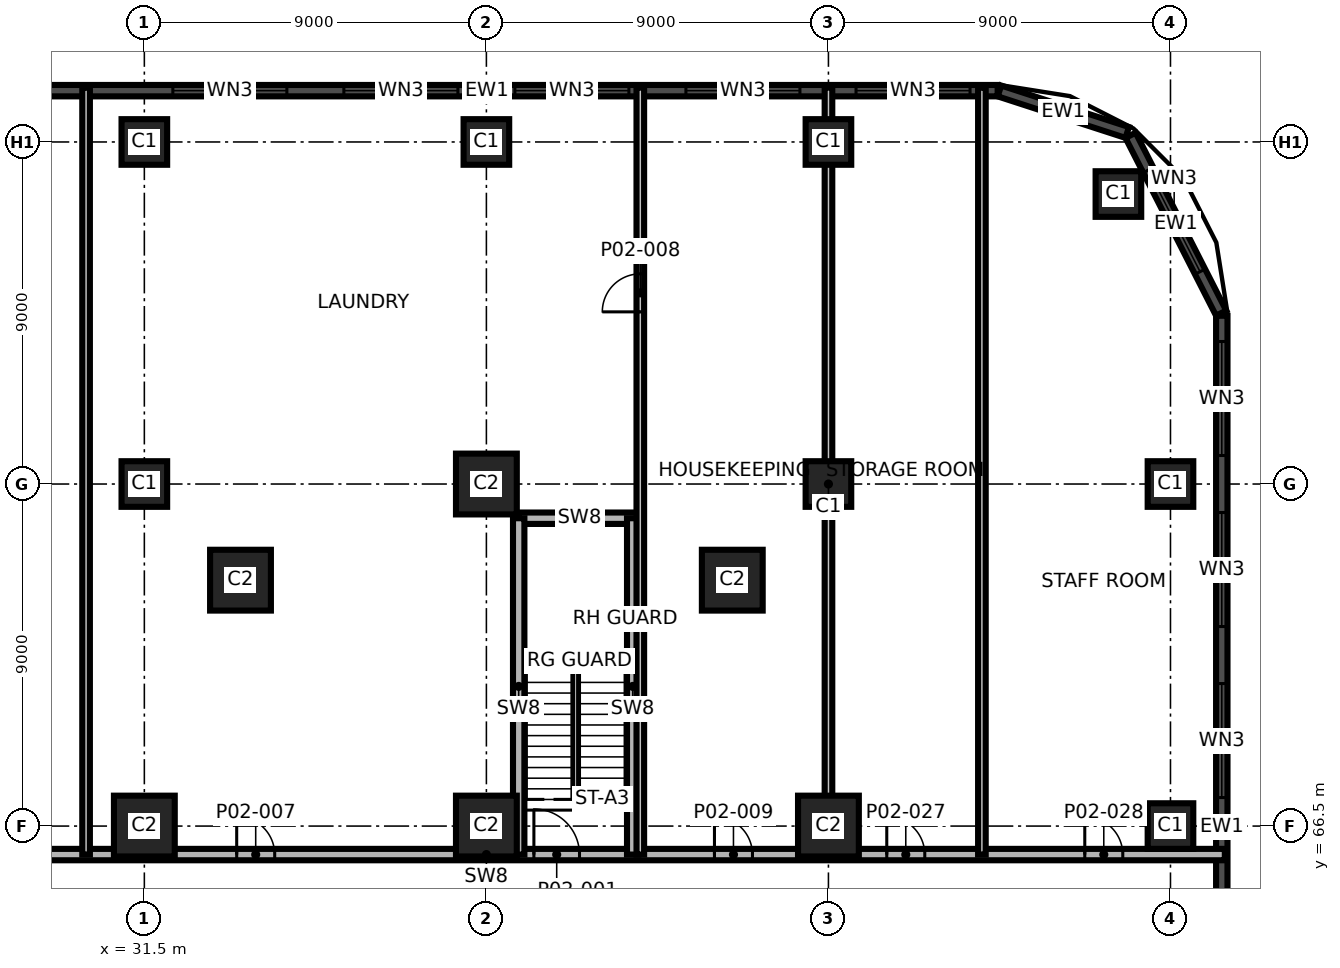
"""IFC4 building model, lengths in metres.
Left out: names, types, materials, properties, quantities, classifications, styles, units other than length and angle.
Written with IfcOpenShell. Run it as: python <this file> out.ifc"""

import sys

from ifc_helpers import new_model, si_unit, direction, frame, frame_2d, origin, origin_2d, place, context, subcontext, project, spatial, rectangle, extrude, element, fill, save


model = new_model("IFC4")
c1 = context("Model", 3, precision=1e-05, world=origin(), true_north=direction((0.0, 1.0)))
c2 = subcontext(c1, "Body", "Model", "MODEL_VIEW")
j1 = project(units=[si_unit("LENGTHUNIT", "METRE"), si_unit("PLANEANGLEUNIT", "RADIAN")], contexts=[c1])
p1 = place(None, origin())
s1 = spatial("IfcSite", under=j1, at=p1, CompositionType="ELEMENT")
p2 = place(p1, origin())
s2 = spatial("IfcBuilding", under=s1, at=p2, CompositionType="ELEMENT")
p3 = place(p2, frame((0.0, 0.0, 13.5)))
s3 = spatial("IfcBuildingStorey", under=s2, at=p3, CompositionType="ELEMENT", Elevation=13.5)
for number, where, z_axis, x_axis in (
    (1, (31.5, 66.5, 0.0), (0.0, 0.0, 1.0), (1.0, 0.0, 0.0)),
    (2, (40.5, 66.5, 0.0), (0.0, 0.0, 1.0), (1.0, 0.0, 0.0)),
    (3, (49.5, 66.5, 0.0), (0.0, 0.0, 1.0), (1.0, 0.0, 0.0)),
):
    element("IfcColumn", number, at=place(p3, frame(where, z_axis=z_axis, x_axis=x_axis)), inside=s3, PredefinedType="COLUMN", context=c2, shape_type="SweptSolid", body=[
        extrude(rectangle(XDim=1.6, YDim=1.6, at=origin_2d()), origin(), (0.0, 0.0, 1.0), 5.0),
    ])
for number, where, z_axis, x_axis in (
    (4, (58.5, 66.5, 0.0), (0.0, 0.0, 1.0), (1.0, 0.0, 0.0)),
    (5, (31.5, 75.5, 0.0), (0.0, 0.0, 1.0), (1.0, 0.0, 0.0)),
):
    element("IfcColumn", number, at=place(p3, frame(where, z_axis=z_axis, x_axis=x_axis)), inside=s3, PredefinedType="COLUMN", context=c2, shape_type="SweptSolid", body=[
        extrude(rectangle(XDim=1.2, YDim=1.2, at=origin_2d()), origin(), (0.0, 0.0, 1.0), 5.0),
    ])
p4 = place(p3, frame((40.5, 75.5, 0.0), z_axis=(0.0, 0.0, 1.0), x_axis=(1.0, 0.0, 0.0)))
e6 = element("IfcColumn", 6, at=p4, inside=s3, PredefinedType="COLUMN", context=c2, shape_type="SweptSolid", body=[
    extrude(rectangle(XDim=1.6, YDim=1.6, at=origin_2d()), origin(), (0.0, 0.0, 1.0), 5.0),
])
for number, where, z_axis, x_axis in (
    (7, (49.5, 75.5, 0.0), (0.0, 0.0, 1.0), (1.0, 0.0, 0.0)),
    (8, (58.5, 75.5, 0.0), (0.0, 0.0, 1.0), (1.0, 0.0, 0.0)),
    (9, (57.13, 83.13, 0.0), (0.0, 0.0, 1.0), (1.0, 0.0, 0.0)),
    (10, (31.5, 84.5, 0.0), (0.0, 0.0, 1.0), (1.0, 0.0, 0.0)),
    (11, (40.5, 84.5, 0.0), (0.0, 0.0, 1.0), (1.0, 0.0, 0.0)),
    (12, (49.5, 84.5, 0.0), (0.0, 0.0, 1.0), (1.0, 0.0, 0.0)),
):
    element("IfcColumn", number, at=place(p3, frame(where, z_axis=z_axis, x_axis=x_axis)), inside=s3, PredefinedType="COLUMN", context=c2, shape_type="SweptSolid", body=[
        extrude(rectangle(XDim=1.2, YDim=1.2, at=origin_2d()), origin(), (0.0, 0.0, 1.0), 5.0),
    ])
for number, where, z_axis, x_axis in (
    (13, (34.03, 72.97, 0.0), (0.0, 0.0, 1.0), (1.0, 0.0, 0.0)),
    (14, (46.97, 72.97, 0.0), (0.0, 0.0, 1.0), (1.0, 0.0, 0.0)),
):
    element("IfcColumn", number, at=place(p3, frame(where, z_axis=z_axis, x_axis=x_axis)), inside=s3, PredefinedType="COLUMN", context=c2, shape_type="SweptSolid", body=[
        extrude(rectangle(XDim=1.6, YDim=1.6, at=origin_2d()), origin(), (0.0, 0.0, 1.0), 5.0),
    ])
p5 = place(p3, frame((59.85, 53.0, 0.0), z_axis=(0.0, 0.0, 1.0), x_axis=(0.0, 1.0, 0.0)))
e15 = element("IfcWall", 15, at=p5, inside=s3, PredefinedType="SOLIDWALL", context=c2, shape_type="SweptSolid", body=[
    extrude(rectangle(XDim=26.928, YDim=0.3, at=frame_2d((13.464, 0.0))), origin(), (0.0, 0.0, 1.0), 4.7),
])
p6 = place(p5, frame((5.25, 0.0, 0.9)))
e16 = element("IfcOpeningElement", 16, at=p6, cuts=e15, PredefinedType="OPENING", context=c2, shape_type="SweptSolid", body=[
    extrude(rectangle(XDim=3.0, YDim=2.4, at=frame_2d((1.5, 1.2))), frame((0.0, 0.16, 0.0), z_axis=(0.0, -1.0, 0.0), x_axis=(1.0, 0.0, 0.0)), (0.0, 0.0, 1.0), 0.32),
])
p7 = place(p5, frame((14.25, 0.0, 0.9)))
e17 = element("IfcOpeningElement", 17, at=p7, cuts=e15, PredefinedType="OPENING", context=c2, shape_type="SweptSolid", body=[
    extrude(rectangle(XDim=3.0, YDim=2.4, at=frame_2d((1.5, 1.2))), frame((0.0, 0.16, 0.0), z_axis=(0.0, -1.0, 0.0), x_axis=(1.0, 0.0, 0.0)), (0.0, 0.0, 1.0), 0.32),
])
p8 = place(p5, frame((18.75, 0.0, 0.9)))
e18 = element("IfcOpeningElement", 18, at=p8, cuts=e15, PredefinedType="OPENING", context=c2, shape_type="SweptSolid", body=[
    extrude(rectangle(XDim=3.0, YDim=2.4, at=frame_2d((1.5, 1.2))), frame((0.0, 0.16, 0.0), z_axis=(0.0, -1.0, 0.0), x_axis=(1.0, 0.0, 0.0)), (0.0, 0.0, 1.0), 0.32),
])
p9 = place(p5, frame((23.25, 0.0, 0.9)))
e19 = element("IfcOpeningElement", 19, at=p9, cuts=e15, PredefinedType="OPENING", context=c2, shape_type="SweptSolid", body=[
    extrude(rectangle(XDim=3.0, YDim=2.4, at=frame_2d((1.5, 1.2))), frame((0.0, 0.16, 0.0), z_axis=(0.0, -1.0, 0.0), x_axis=(1.0, 0.0, 0.0)), (0.0, 0.0, 1.0), 0.32),
])
p10 = place(p3, frame((59.834, 79.996, 0.0), z_axis=(0.0, 0.0, 1.0), x_axis=(-0.454006562826, 0.890998339455, 0.0)))
e20 = element("IfcWall", 20, at=p10, inside=s3, PredefinedType="SOLIDWALL", context=c2, shape_type="SweptSolid", body=[
    extrude(rectangle(XDim=5.252, YDim=0.3, at=frame_2d((2.626, 0.0))), origin(), (0.0, 0.0, 1.0), 4.7),
])
p11 = place(p10, frame((1.224, 0.0, 0.9)))
e21 = element("IfcOpeningElement", 21, at=p11, cuts=e20, PredefinedType="OPENING", context=c2, shape_type="SweptSolid", body=[
    extrude(rectangle(XDim=3.0, YDim=2.4, at=frame_2d((1.5, 1.2))), frame((0.0, 0.16, 0.0), z_axis=(0.0, -1.0, 0.0), x_axis=(1.0, 0.0, 0.0)), (0.0, 0.0, 1.0), 0.32),
])
p12 = place(p3, frame((57.362, 84.75, 0.0), z_axis=(0.0, 0.0, 1.0), x_axis=(-0.951038127287, 0.309073584194, 0.0)))
e22 = element("IfcWall", 22, at=p12, inside=s3, PredefinedType="SOLIDWALL", context=c2, shape_type="SweptSolid", body=[
    extrude(rectangle(XDim=3.536, YDim=0.3, at=frame_2d((1.768, 0.0))), origin(), (0.0, 0.0, 1.0), 4.7),
])
p13 = place(p3, frame((53.952, 85.85, 0.0), z_axis=(0.0, 0.0, 1.0), x_axis=(-1.0, 0.0, 0.0)))
e23 = element("IfcWall", 23, at=p13, inside=s3, PredefinedType="SOLIDWALL", context=c2, shape_type="SweptSolid", body=[
    extrude(rectangle(XDim=26.88, YDim=0.3, at=frame_2d((13.44, 0.0))), origin(), (0.0, 0.0, 1.0), 4.7),
])
p14 = place(p13, frame((0.726, 0.0, 0.9)))
e24 = element("IfcOpeningElement", 24, at=p14, cuts=e23, PredefinedType="OPENING", context=c2, shape_type="SweptSolid", body=[
    extrude(rectangle(XDim=3.0, YDim=2.4, at=frame_2d((1.5, 1.2))), frame((0.0, 0.16, 0.0), z_axis=(0.0, -1.0, 0.0), x_axis=(1.0, 0.0, 0.0)), (0.0, 0.0, 1.0), 0.32),
])
p15 = place(p13, frame((5.202, 0.0, 0.9)))
e25 = element("IfcOpeningElement", 25, at=p15, cuts=e23, PredefinedType="OPENING", context=c2, shape_type="SweptSolid", body=[
    extrude(rectangle(XDim=3.0, YDim=2.4, at=frame_2d((1.5, 1.2))), frame((0.0, 0.16, 0.0), z_axis=(0.0, -1.0, 0.0), x_axis=(1.0, 0.0, 0.0)), (0.0, 0.0, 1.0), 0.32),
])
p16 = place(p13, frame((9.702, 0.0, 0.9)))
e26 = element("IfcOpeningElement", 26, at=p16, cuts=e23, PredefinedType="OPENING", context=c2, shape_type="SweptSolid", body=[
    extrude(rectangle(XDim=3.0, YDim=2.4, at=frame_2d((1.5, 1.2))), frame((0.0, 0.16, 0.0), z_axis=(0.0, -1.0, 0.0), x_axis=(1.0, 0.0, 0.0)), (0.0, 0.0, 1.0), 0.32),
])
p17 = place(p13, frame((14.202, 0.0, 0.9)))
e27 = element("IfcOpeningElement", 27, at=p17, cuts=e23, PredefinedType="OPENING", context=c2, shape_type="SweptSolid", body=[
    extrude(rectangle(XDim=3.0, YDim=2.4, at=frame_2d((1.5, 1.2))), frame((0.0, 0.16, 0.0), z_axis=(0.0, -1.0, 0.0), x_axis=(1.0, 0.0, 0.0)), (0.0, 0.0, 1.0), 0.32),
])
p18 = place(p13, frame((18.702, 0.0, 0.9)))
e28 = element("IfcOpeningElement", 28, at=p18, cuts=e23, PredefinedType="OPENING", context=c2, shape_type="SweptSolid", body=[
    extrude(rectangle(XDim=3.0, YDim=2.4, at=frame_2d((1.5, 1.2))), frame((0.0, 0.16, 0.0), z_axis=(0.0, -1.0, 0.0), x_axis=(1.0, 0.0, 0.0)), (0.0, 0.0, 1.0), 0.32),
])
p19 = place(p3, frame((21.07, 65.75, 0.0), z_axis=(0.0, 0.0, 1.0), x_axis=(1.0, 0.0, 0.0)))
e29 = element("IfcWall", 29, at=p19, inside=s3, PredefinedType="SHEAR", context=c2, shape_type="SweptSolid", body=[
    extrude(rectangle(XDim=38.86, YDim=0.3, at=frame_2d((19.43, 0.0))), origin(), (0.0, 0.0, 1.0), 4.7),
])
p20 = place(p19, frame((20.68, 0.0, 0.0)))
e30 = element("IfcOpeningElement", 30, at=p20, cuts=e29, PredefinedType="OPENING", context=c2, shape_type="SweptSolid", body=[
    extrude(rectangle(XDim=1.2, YDim=2.1, at=frame_2d((0.6, 1.05))), frame((0.0, 0.16, 0.0), z_axis=(0.0, -1.0, 0.0), x_axis=(1.0, 0.0, 0.0)), (0.0, 0.0, 1.0), 0.32),
])
p21 = place(p19, frame((12.86, 0.0, 0.0)))
e31 = element("IfcOpeningElement", 31, at=p21, cuts=e29, PredefinedType="OPENING", context=c2, shape_type="SweptSolid", body=[
    extrude(rectangle(XDim=1.0, YDim=2.1, at=frame_2d((0.5, 1.05))), frame((0.0, 0.16, 0.0), z_axis=(0.0, -1.0, 0.0), x_axis=(1.0, 0.0, 0.0)), (0.0, 0.0, 1.0), 0.32),
])
p22 = place(p19, frame((25.431, 0.0, 0.0)))
e32 = element("IfcOpeningElement", 32, at=p22, cuts=e29, PredefinedType="OPENING", context=c2, shape_type="SweptSolid", body=[
    extrude(rectangle(XDim=1.0, YDim=2.1, at=frame_2d((0.5, 1.05))), frame((0.0, 0.16, 0.0), z_axis=(0.0, -1.0, 0.0), x_axis=(1.0, 0.0, 0.0)), (0.0, 0.0, 1.0), 0.32),
])
p23 = place(p19, frame((3.886, 0.0, 0.0)))
e33 = element("IfcOpeningElement", 33, at=p23, cuts=e29, PredefinedType="OPENING", context=c2, shape_type="SweptSolid", body=[
    extrude(rectangle(XDim=1.0, YDim=2.1, at=frame_2d((0.5, 1.05))), frame((0.0, 0.16, 0.0), z_axis=(0.0, -1.0, 0.0), x_axis=(1.0, 0.0, 0.0)), (0.0, 0.0, 1.0), 0.32),
])
p24 = place(p19, frame((29.965, 0.0, 0.0)))
e34 = element("IfcOpeningElement", 34, at=p24, cuts=e29, PredefinedType="OPENING", context=c2, shape_type="SweptSolid", body=[
    extrude(rectangle(XDim=1.0, YDim=2.1, at=frame_2d((0.5, 1.05))), frame((0.0, 0.16, 0.0), z_axis=(0.0, -1.0, 0.0), x_axis=(1.0, 0.0, 0.0)), (0.0, 0.0, 1.0), 0.32),
])
p25 = place(p19, frame((35.175, 0.0, 0.0)))
e35 = element("IfcOpeningElement", 35, at=p25, cuts=e29, PredefinedType="OPENING", context=c2, shape_type="SweptSolid", body=[
    extrude(rectangle(XDim=1.0, YDim=2.1, at=frame_2d((0.5, 1.05))), frame((0.0, 0.16, 0.0), z_axis=(0.0, -1.0, 0.0), x_axis=(1.0, 0.0, 0.0)), (0.0, 0.0, 1.0), 0.32),
])
p26 = place(p3, frame((41.35, 74.6, 0.0), z_axis=(0.0, 0.0, 1.0), x_axis=(1.0, 0.0, 0.0)))
e36 = element("IfcWall", 36, at=p26, inside=s3, PredefinedType="SHEAR", context=c2, shape_type="SweptSolid", body=[
    extrude(rectangle(XDim=3.2, YDim=0.3, at=frame_2d((1.6, 0.0))), origin(), (0.0, 0.0, 1.0), 4.7),
])
p27 = place(p3, frame((29.967, 65.75, 0.0), z_axis=(0.0, 0.0, 1.0), x_axis=(0.0, 1.0, 0.0)))
e37 = element("IfcWall", 37, at=p27, inside=s3, PredefinedType="PARTITIONING", context=c2, shape_type="SweptSolid", body=[
    extrude(rectangle(XDim=20.18, YDim=0.2, at=frame_2d((10.09, 0.0))), origin(), (0.0, 0.0, 1.0), 4.7),
])
for number, where, z_axis, x_axis in (
    (38, (41.35, 65.75, 0.0), (0.0, 0.0, 1.0), (0.0, 1.0, 0.0)),
    (39, (44.35, 65.75, 0.0), (0.0, 0.0, 1.0), (0.0, 1.0, 0.0)),
):
    element("IfcWall", number, at=place(p3, frame(where, z_axis=z_axis, x_axis=x_axis)), inside=s3, PredefinedType="SHEAR", context=c2, shape_type="SweptSolid", body=[
        extrude(rectangle(XDim=8.85, YDim=0.3, at=frame_2d((4.425, 0.0))), origin(), (0.0, 0.0, 1.0), 4.7),
    ])
p28 = place(p3, frame((44.55, 65.75, 0.0), z_axis=(0.0, 0.0, 1.0), x_axis=(0.0, 1.0, 0.0)))
e40 = element("IfcWall", 40, at=p28, inside=s3, PredefinedType="PARTITIONING", context=c2, shape_type="SweptSolid", body=[
    extrude(rectangle(XDim=20.18, YDim=0.2, at=frame_2d((10.09, 0.0))), origin(), (0.0, 0.0, 1.0), 4.7),
])
p29 = place(p28, frame((14.28, 0.0, 0.0)))
e41 = element("IfcOpeningElement", 41, at=p29, cuts=e40, PredefinedType="OPENING", context=c2, shape_type="SweptSolid", body=[
    extrude(rectangle(XDim=1.0, YDim=2.1, at=frame_2d((0.5, 1.05))), frame((0.0, 0.11, 0.0), z_axis=(0.0, -1.0, 0.0), x_axis=(1.0, 0.0, 0.0)), (0.0, 0.0, 1.0), 0.22),
])
for number, where, z_axis, x_axis in (
    (42, (49.501, 65.75, 0.0), (0.0, 0.0, 1.0), (0.0, 1.0, 0.0)),
    (43, (53.538, 65.75, 0.0), (0.0, 0.0, 1.0), (0.0, 1.0, 0.0)),
):
    element("IfcWall", number, at=place(p3, frame(where, z_axis=z_axis, x_axis=x_axis)), inside=s3, PredefinedType="PARTITIONING", context=c2, shape_type="SweptSolid", body=[
        extrude(rectangle(XDim=20.18, YDim=0.2, at=frame_2d((10.09, 0.0))), origin(), (0.0, 0.0, 1.0), 4.7),
    ])
p30 = place(p7, origin())
e44 = element("IfcWindow", 44, at=p30, inside=s3, PartitioningType="SINGLE_PANEL", PredefinedType="WINDOW", context=c2, shape_type="SweptSolid", body=[
    extrude(rectangle(XDim=3.0, YDim=2.4, at=frame_2d((1.5, 1.2))), frame((0.0, 0.03, 0.0), z_axis=(0.0, -1.0, 0.0), x_axis=(1.0, 0.0, 0.0)), (0.0, 0.0, 1.0), 0.06),
])
fill(e17, e44)
p31 = place(p8, origin())
e45 = element("IfcWindow", 45, at=p31, inside=s3, PartitioningType="SINGLE_PANEL", PredefinedType="WINDOW", context=c2, shape_type="SweptSolid", body=[
    extrude(rectangle(XDim=3.0, YDim=2.4, at=frame_2d((1.5, 1.2))), frame((0.0, 0.03, 0.0), z_axis=(0.0, -1.0, 0.0), x_axis=(1.0, 0.0, 0.0)), (0.0, 0.0, 1.0), 0.06),
])
fill(e18, e45)
p32 = place(p9, origin())
e46 = element("IfcWindow", 46, at=p32, inside=s3, PartitioningType="SINGLE_PANEL", PredefinedType="WINDOW", context=c2, shape_type="SweptSolid", body=[
    extrude(rectangle(XDim=3.0, YDim=2.4, at=frame_2d((1.5, 1.2))), frame((0.0, 0.03, 0.0), z_axis=(0.0, -1.0, 0.0), x_axis=(1.0, 0.0, 0.0)), (0.0, 0.0, 1.0), 0.06),
])
fill(e19, e46)
p33 = place(p11, origin())
e47 = element("IfcWindow", 47, at=p33, inside=s3, PartitioningType="SINGLE_PANEL", PredefinedType="WINDOW", context=c2, shape_type="SweptSolid", body=[
    extrude(rectangle(XDim=3.0, YDim=2.4, at=frame_2d((1.5, 1.2))), frame((0.0, 0.03, 0.0), z_axis=(0.0, -1.0, 0.0), x_axis=(1.0, 0.0, 0.0)), (0.0, 0.0, 1.0), 0.06),
])
fill(e21, e47)
p34 = place(p14, origin())
e48 = element("IfcWindow", 48, at=p34, inside=s3, PartitioningType="SINGLE_PANEL", PredefinedType="WINDOW", context=c2, shape_type="SweptSolid", body=[
    extrude(rectangle(XDim=3.0, YDim=2.4, at=frame_2d((1.5, 1.2))), frame((0.0, 0.03, 0.0), z_axis=(0.0, -1.0, 0.0), x_axis=(1.0, 0.0, 0.0)), (0.0, 0.0, 1.0), 0.06),
])
fill(e24, e48)
p35 = place(p15, origin())
e49 = element("IfcWindow", 49, at=p35, inside=s3, PartitioningType="SINGLE_PANEL", PredefinedType="WINDOW", context=c2, shape_type="SweptSolid", body=[
    extrude(rectangle(XDim=3.0, YDim=2.4, at=frame_2d((1.5, 1.2))), frame((0.0, 0.03, 0.0), z_axis=(0.0, -1.0, 0.0), x_axis=(1.0, 0.0, 0.0)), (0.0, 0.0, 1.0), 0.06),
])
fill(e25, e49)
p36 = place(p16, origin())
e50 = element("IfcWindow", 50, at=p36, inside=s3, PartitioningType="SINGLE_PANEL", PredefinedType="WINDOW", context=c2, shape_type="SweptSolid", body=[
    extrude(rectangle(XDim=3.0, YDim=2.4, at=frame_2d((1.5, 1.2))), frame((0.0, 0.03, 0.0), z_axis=(0.0, -1.0, 0.0), x_axis=(1.0, 0.0, 0.0)), (0.0, 0.0, 1.0), 0.06),
])
fill(e26, e50)
p37 = place(p17, origin())
e51 = element("IfcWindow", 51, at=p37, inside=s3, PartitioningType="SINGLE_PANEL", PredefinedType="WINDOW", context=c2, shape_type="SweptSolid", body=[
    extrude(rectangle(XDim=3.0, YDim=2.4, at=frame_2d((1.5, 1.2))), frame((0.0, 0.03, 0.0), z_axis=(0.0, -1.0, 0.0), x_axis=(1.0, 0.0, 0.0)), (0.0, 0.0, 1.0), 0.06),
])
fill(e27, e51)
p38 = place(p18, origin())
e52 = element("IfcWindow", 52, at=p38, inside=s3, PartitioningType="SINGLE_PANEL", PredefinedType="WINDOW", context=c2, shape_type="SweptSolid", body=[
    extrude(rectangle(XDim=3.0, YDim=2.4, at=frame_2d((1.5, 1.2))), frame((0.0, 0.03, 0.0), z_axis=(0.0, -1.0, 0.0), x_axis=(1.0, 0.0, 0.0)), (0.0, 0.0, 1.0), 0.06),
])
fill(e28, e52)
p39 = place(p20, origin())
e53 = element("IfcDoor", 53, at=p39, inside=s3, OperationType="SINGLE_SWING_LEFT", PredefinedType="DOOR", context=c2, shape_type="SweptSolid", body=[
    extrude(rectangle(XDim=1.2, YDim=2.1, at=frame_2d((0.6, 1.05))), frame((0.0, 0.025, 0.0), z_axis=(0.0, -1.0, 0.0), x_axis=(1.0, 0.0, 0.0)), (0.0, 0.0, 1.0), 0.05),
])
fill(e30, e53)
p40 = place(p21, origin())
e54 = element("IfcDoor", 54, at=p40, inside=s3, OperationType="SINGLE_SWING_LEFT", PredefinedType="DOOR", context=c2, shape_type="SweptSolid", body=[
    extrude(rectangle(XDim=1.0, YDim=2.1, at=frame_2d((0.5, 1.05))), frame((0.0, 0.025, 0.0), z_axis=(0.0, -1.0, 0.0), x_axis=(1.0, 0.0, 0.0)), (0.0, 0.0, 1.0), 0.05),
])
fill(e31, e54)
p41 = place(p29, origin())
e55 = element("IfcDoor", 55, at=p41, inside=s3, OperationType="SINGLE_SWING_RIGHT", PredefinedType="DOOR", context=c2, shape_type="SweptSolid", body=[
    extrude(rectangle(XDim=1.0, YDim=2.1, at=frame_2d((0.5, 1.05))), frame((0.0, 0.025, 0.0), z_axis=(0.0, -1.0, 0.0), x_axis=(1.0, 0.0, 0.0)), (0.0, 0.0, 1.0), 0.05),
])
fill(e41, e55)
p42 = place(p22, origin())
e56 = element("IfcDoor", 56, at=p42, inside=s3, OperationType="SINGLE_SWING_LEFT", PredefinedType="DOOR", context=c2, shape_type="SweptSolid", body=[
    extrude(rectangle(XDim=1.0, YDim=2.1, at=frame_2d((0.5, 1.05))), frame((0.0, 0.025, 0.0), z_axis=(0.0, -1.0, 0.0), x_axis=(1.0, 0.0, 0.0)), (0.0, 0.0, 1.0), 0.05),
])
fill(e32, e56)
p43 = place(p24, origin())
e57 = element("IfcDoor", 57, at=p43, inside=s3, OperationType="SINGLE_SWING_LEFT", PredefinedType="DOOR", context=c2, shape_type="SweptSolid", body=[
    extrude(rectangle(XDim=1.0, YDim=2.1, at=frame_2d((0.5, 1.05))), frame((0.0, 0.025, 0.0), z_axis=(0.0, -1.0, 0.0), x_axis=(1.0, 0.0, 0.0)), (0.0, 0.0, 1.0), 0.05),
])
fill(e34, e57)
p44 = place(p25, origin())
e58 = element("IfcDoor", 58, at=p44, inside=s3, OperationType="SINGLE_SWING_RIGHT", PredefinedType="DOOR", context=c2, shape_type="SweptSolid", body=[
    extrude(rectangle(XDim=1.0, YDim=2.1, at=frame_2d((0.5, 1.05))), frame((0.0, 0.025, 0.0), z_axis=(0.0, -1.0, 0.0), x_axis=(1.0, 0.0, 0.0)), (0.0, 0.0, 1.0), 0.05),
])
fill(e35, e58)
save(model, sys.argv[1])
